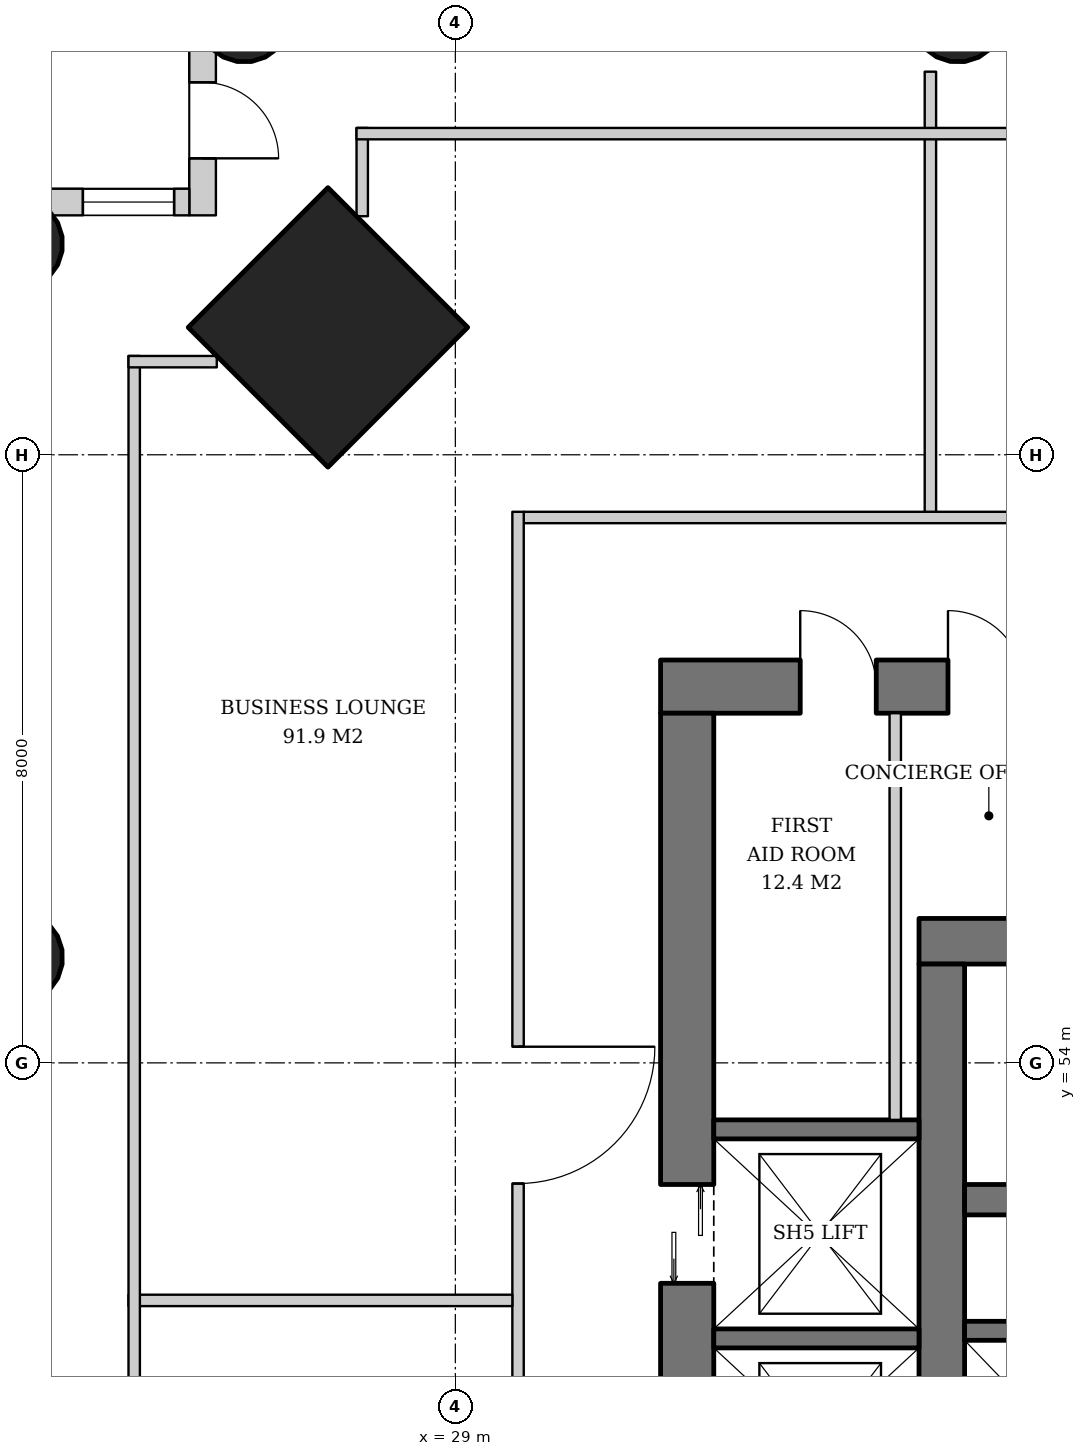
"""IFC4 building model, lengths in metres.
Left out: names, types, materials, properties, quantities, classifications, styles, units other than length and angle.
Written with IfcOpenShell. Run it as: python <this file> out.ifc"""

import sys

from ifc_helpers import new_model, si_unit, direction, frame, frame_2d, origin, origin_2d, place, context, subcontext, project, spatial, rectangle, hollow_circle, extrude, element, fill, save


model = new_model("IFC4")
c1 = context("Model", 3, precision=1e-05, world=origin(), true_north=direction((0.0, 1.0)))
c2 = subcontext(c1, "Body", "Model", "MODEL_VIEW")
j1 = project(units=[si_unit("LENGTHUNIT", "METRE"), si_unit("PLANEANGLEUNIT", "RADIAN")], contexts=[c1])
p1 = place(None, origin())
s1 = spatial("IfcSite", under=j1, at=p1, CompositionType="ELEMENT")
p2 = place(p1, origin())
s2 = spatial("IfcBuilding", under=s1, at=p2, CompositionType="ELEMENT")
p3 = place(p2, frame((0.0, 0.0, 89.4)))
s3 = spatial("IfcBuildingStorey", under=s2, at=p3, CompositionType="ELEMENT", Elevation=89.4)
p4 = place(p3, frame((27.286, 63.714, 0.0), z_axis=(0.031962158256, -0.031962158256, 0.998977898093), x_axis=(0.707106781187, 0.707106781187, 0.0)))
e1 = element("IfcColumn", 1, at=p4, inside=s3, PredefinedType="COLUMN", context=c2, shape_type="SweptSolid", body=[
    extrude(rectangle(XDim=2.6, YDim=2.6, at=origin_2d()), origin(), (0.0, 0.0, 1.0), 3.804),
])
p5 = place(p3, frame((26.186, 67.814, 0.0), z_axis=(0.031898107953, -0.031898107953, 0.998981992539), x_axis=(0.707106781187, 0.707106781187, 0.0)))
e2 = element("IfcColumn", 2, at=p5, inside=s3, PredefinedType="COLUMN", context=c2, shape_type="SweptSolid", body=[
    extrude(hollow_circle(Radius=0.61, WallThickness=0.04, at=origin_2d()), origin(), (0.0, 0.0, 1.0), 3.804),
])
p6 = place(p3, frame((35.593, 67.814, 0.0), z_axis=(0.015987237665, -0.031910269556, 0.999362868496), x_axis=(0.894067115991, 0.447933021895, 0.0)))
e3 = element("IfcColumn", 3, at=p6, inside=s3, PredefinedType="COLUMN", context=c2, shape_type="SweptSolid", body=[
    extrude(hollow_circle(Radius=0.61, WallThickness=0.04, at=origin_2d()), origin(), (0.0, 0.0, 1.0), 3.802),
])
p7 = place(p3, frame((23.186, 64.814, 0.0), z_axis=(0.031898107953, -0.031898107953, 0.998981992539), x_axis=(0.707106781187, 0.707106781187, 0.0)))
e4 = element("IfcColumn", 4, at=p7, inside=s3, PredefinedType="COLUMN", context=c2, shape_type="SweptSolid", body=[
    extrude(hollow_circle(Radius=0.61, WallThickness=0.04, at=origin_2d()), origin(), (0.0, 0.0, 1.0), 3.804),
])
p8 = place(p3, frame((23.186, 55.407, 0.0), z_axis=(0.031910269556, -0.015987237665, 0.999362868496), x_axis=(0.447933021895, 0.894067115991, 0.0)))
e5 = element("IfcColumn", 5, at=p8, inside=s3, PredefinedType="COLUMN", context=c2, shape_type="SweptSolid", body=[
    extrude(hollow_circle(Radius=0.61, WallThickness=0.04, at=origin_2d()), origin(), (0.0, 0.0, 1.0), 3.802),
])
p9 = place(p3, frame((35.1, 55.6, 0.0), z_axis=(0.0, 0.0, 1.0), x_axis=(1.0, 0.0, 0.0)))
e6 = element("IfcWall", 6, at=p9, inside=s3, PredefinedType="SHEAR", context=c2, shape_type="SweptSolid", body=[
    extrude(rectangle(XDim=19.8, YDim=0.6, at=frame_2d((9.9, 0.0))), origin(), (0.0, 0.0, 1.0), 3.8),
])
p10 = place(p9, frame((14.54, 0.0, 0.0)))
e7 = element("IfcOpeningElement", 7, at=p10, cuts=e6, PredefinedType="OPENING", context=c2, shape_type="SweptSolid", body=[
    extrude(rectangle(XDim=1.0, YDim=2.1, at=frame_2d((0.5, 1.05))), frame((0.0, 0.31, 0.0), z_axis=(0.0, -1.0, 0.0), x_axis=(1.0, 0.0, 0.0)), (0.0, 0.0, 1.0), 0.62),
])
p11 = place(p9, frame((2.425, 0.0, 0.0)))
e8 = element("IfcOpeningElement", 8, at=p11, cuts=e6, PredefinedType="OPENING", context=c2, shape_type="SweptSolid", body=[
    extrude(rectangle(XDim=1.0, YDim=2.1, at=frame_2d((0.5, 1.05))), frame((0.0, 0.31, 0.0), z_axis=(0.0, -1.0, 0.0), x_axis=(1.0, 0.0, 0.0)), (0.0, 0.0, 1.0), 0.62),
])
p12 = place(p3, frame((35.4, 36.7, 0.0), z_axis=(0.0, 0.0, 1.0), x_axis=(0.0, 1.0, 0.0)))
e9 = element("IfcWall", 9, at=p12, inside=s3, PredefinedType="SHEAR", context=c2, shape_type="SweptSolid", body=[
    extrude(rectangle(XDim=18.6, YDim=0.6, at=frame_2d((9.3, 0.0))), origin(), (0.0, 0.0, 1.0), 3.8),
])
p13 = place(p12, frame((8.4, 0.0, 0.0)))
e10 = element("IfcOpeningElement", 10, at=p13, cuts=e9, PredefinedType="OPENING", context=c2, shape_type="SweptSolid", body=[
    extrude(rectangle(XDim=1.8, YDim=2.4, at=frame_2d((0.9, 1.2))), frame((0.0, 0.31, 0.0), z_axis=(0.0, -1.0, 0.0), x_axis=(1.0, 0.0, 0.0)), (0.0, 0.0, 1.0), 0.62),
])
p14 = place(p3, frame((31.7, 58.95, 0.0), z_axis=(0.0, 0.0, 1.0), x_axis=(1.0, 0.0, 0.0)))
e11 = element("IfcWall", 11, at=p14, inside=s3, PredefinedType="SHEAR", context=c2, shape_type="SweptSolid", body=[
    extrude(rectangle(XDim=26.6, YDim=0.7, at=frame_2d((13.3, 0.0))), origin(), (0.0, 0.0, 1.0), 3.8),
])
p15 = place(p14, frame((17.94, 0.0, 0.0)))
e12 = element("IfcOpeningElement", 12, at=p15, cuts=e11, PredefinedType="OPENING", context=c2, shape_type="SweptSolid", body=[
    extrude(rectangle(XDim=1.0, YDim=2.1, at=frame_2d((0.5, 1.05))), frame((0.0, 0.36, 0.0), z_axis=(0.0, -1.0, 0.0), x_axis=(1.0, 0.0, 0.0)), (0.0, 0.0, 1.0), 0.72),
])
p16 = place(p14, frame((5.825, 0.0, 0.0)))
e13 = element("IfcOpeningElement", 13, at=p16, cuts=e11, PredefinedType="OPENING", context=c2, shape_type="SweptSolid", body=[
    extrude(rectangle(XDim=1.0, YDim=2.1, at=frame_2d((0.5, 1.05))), frame((0.0, 0.36, 0.0), z_axis=(0.0, -1.0, 0.0), x_axis=(1.0, 0.0, 0.0)), (0.0, 0.0, 1.0), 0.72),
])
p17 = place(p14, frame((1.837, 0.0, 0.0)))
e14 = element("IfcOpeningElement", 14, at=p17, cuts=e11, PredefinedType="OPENING", context=c2, shape_type="SweptSolid", body=[
    extrude(rectangle(XDim=1.0, YDim=2.1, at=frame_2d((0.5, 1.05))), frame((0.0, 0.36, 0.0), z_axis=(0.0, -1.0, 0.0), x_axis=(1.0, 0.0, 0.0)), (0.0, 0.0, 1.0), 0.72),
])
p18 = place(p14, frame((3.781, 0.0, 0.0)))
e15 = element("IfcOpeningElement", 15, at=p18, cuts=e11, PredefinedType="OPENING", context=c2, shape_type="SweptSolid", body=[
    extrude(rectangle(XDim=1.0, YDim=2.1, at=frame_2d((0.5, 1.05))), frame((0.0, 0.36, 0.0), z_axis=(0.0, -1.0, 0.0), x_axis=(1.0, 0.0, 0.0)), (0.0, 0.0, 1.0), 0.72),
])
p19 = place(p14, frame((11.577, 0.0, 0.0)))
e16 = element("IfcOpeningElement", 16, at=p19, cuts=e11, PredefinedType="OPENING", context=c2, shape_type="SweptSolid", body=[
    extrude(rectangle(XDim=1.0, YDim=2.1, at=frame_2d((0.5, 1.05))), frame((0.0, 0.36, 0.0), z_axis=(0.0, -1.0, 0.0), x_axis=(1.0, 0.0, 0.0)), (0.0, 0.0, 1.0), 0.72),
])
p20 = place(p14, frame((20.9, 0.0, 0.0)))
e17 = element("IfcOpeningElement", 17, at=p20, cuts=e11, PredefinedType="OPENING", context=c2, shape_type="SweptSolid", body=[
    extrude(rectangle(XDim=1.0, YDim=2.1, at=frame_2d((0.5, 1.05))), frame((0.0, 0.36, 0.0), z_axis=(0.0, -1.0, 0.0), x_axis=(1.0, 0.0, 0.0)), (0.0, 0.0, 1.0), 0.72),
])
p21 = place(p14, frame((23.75, 0.0, 0.0)))
e18 = element("IfcOpeningElement", 18, at=p21, cuts=e11, PredefinedType="OPENING", context=c2, shape_type="SweptSolid", body=[
    extrude(rectangle(XDim=1.0, YDim=2.1, at=frame_2d((0.5, 1.05))), frame((0.0, 0.36, 0.0), z_axis=(0.0, -1.0, 0.0), x_axis=(1.0, 0.0, 0.0)), (0.0, 0.0, 1.0), 0.72),
])
p22 = place(p3, frame((32.05, 33.4, 0.0), z_axis=(0.0, 0.0, 1.0), x_axis=(0.0, 1.0, 0.0)))
e19 = element("IfcWall", 19, at=p22, inside=s3, PredefinedType="SHEAR", context=c2, shape_type="SweptSolid", body=[
    extrude(rectangle(XDim=25.2, YDim=0.7, at=frame_2d((12.6, 0.0))), origin(), (0.0, 0.0, 1.0), 3.8),
])
p23 = place(p22, frame((3.45, 0.0, 0.0)))
e20 = element("IfcOpeningElement", 20, at=p23, cuts=e19, PredefinedType="OPENING", context=c2, shape_type="SweptSolid", body=[
    extrude(rectangle(XDim=1.3, YDim=2.2, at=frame_2d((0.65, 1.1))), frame((0.0, 0.36, 0.0), z_axis=(0.0, -1.0, 0.0), x_axis=(1.0, 0.0, 0.0)), (0.0, 0.0, 1.0), 0.72),
])
p24 = place(p22, frame((6.2, 0.0, 0.0)))
e21 = element("IfcOpeningElement", 21, at=p24, cuts=e19, PredefinedType="OPENING", context=c2, shape_type="SweptSolid", body=[
    extrude(rectangle(XDim=1.3, YDim=2.2, at=frame_2d((0.65, 1.1))), frame((0.0, 0.36, 0.0), z_axis=(0.0, -1.0, 0.0), x_axis=(1.0, 0.0, 0.0)), (0.0, 0.0, 1.0), 0.72),
])
p25 = place(p22, frame((8.95, 0.0, 0.0)))
e22 = element("IfcOpeningElement", 22, at=p25, cuts=e19, PredefinedType="OPENING", context=c2, shape_type="SweptSolid", body=[
    extrude(rectangle(XDim=1.3, YDim=2.2, at=frame_2d((0.65, 1.1))), frame((0.0, 0.36, 0.0), z_axis=(0.0, -1.0, 0.0), x_axis=(1.0, 0.0, 0.0)), (0.0, 0.0, 1.0), 0.72),
])
p26 = place(p22, frame((14.95, 0.0, 0.0)))
e23 = element("IfcOpeningElement", 23, at=p26, cuts=e19, PredefinedType="OPENING", context=c2, shape_type="SweptSolid", body=[
    extrude(rectangle(XDim=1.3, YDim=2.2, at=frame_2d((0.65, 1.1))), frame((0.0, 0.36, 0.0), z_axis=(0.0, -1.0, 0.0), x_axis=(1.0, 0.0, 0.0)), (0.0, 0.0, 1.0), 0.72),
])
p27 = place(p22, frame((17.7, 0.0, 0.0)))
e24 = element("IfcOpeningElement", 24, at=p27, cuts=e19, PredefinedType="OPENING", context=c2, shape_type="SweptSolid", body=[
    extrude(rectangle(XDim=1.3, YDim=2.2, at=frame_2d((0.65, 1.1))), frame((0.0, 0.36, 0.0), z_axis=(0.0, -1.0, 0.0), x_axis=(1.0, 0.0, 0.0)), (0.0, 0.0, 1.0), 0.72),
])
p28 = place(p22, frame((11.7, 0.0, 0.0)))
e25 = element("IfcOpeningElement", 25, at=p28, cuts=e19, PredefinedType="OPENING", context=c2, shape_type="SweptSolid", body=[
    extrude(rectangle(XDim=1.8, YDim=2.4, at=frame_2d((0.9, 1.2))), frame((0.0, 0.36, 0.0), z_axis=(0.0, -1.0, 0.0), x_axis=(1.0, 0.0, 0.0)), (0.0, 0.0, 1.0), 0.72),
])
p29 = place(p3, frame((35.7, 52.2, 0.0), z_axis=(0.0, 0.0, 1.0), x_axis=(1.0, 0.0, 0.0)))
e26 = element("IfcWall", 26, at=p29, inside=s3, PredefinedType="SHEAR", context=c2, shape_type="SweptSolid", body=[
    extrude(rectangle(XDim=18.6, YDim=0.4, at=frame_2d((9.3, 0.0))), origin(), (0.0, 0.0, 1.0), 3.8),
])
p30 = place(p3, frame((25.675, 68.5, 0.0), z_axis=(0.0, 0.0, 1.0), x_axis=(0.0, -1.0, 0.0)))
e27 = element("IfcWall", 27, at=p30, inside=s3, PredefinedType="SOLIDWALL", context=c2, shape_type="SweptSolid", body=[
    extrude(rectangle(XDim=3.35, YDim=0.35, at=frame_2d((1.675, 0.0))), origin(), (0.0, 0.0, 1.0), 3.62),
])
p31 = place(p30, frame((1.6, 0.0, 0.0)))
e28 = element("IfcOpeningElement", 28, at=p31, cuts=e27, PredefinedType="OPENING", context=c2, shape_type="SweptSolid", body=[
    extrude(rectangle(XDim=1.0, YDim=2.4, at=frame_2d((0.5, 1.2))), frame((0.0, 0.185, 0.0), z_axis=(0.0, -1.0, 0.0), x_axis=(1.0, 0.0, 0.0)), (0.0, 0.0, 1.0), 0.37),
])
p32 = place(p3, frame((25.5, 65.325, 0.0), z_axis=(0.0, 0.0, 1.0), x_axis=(-1.0, 0.0, 0.0)))
e29 = element("IfcWall", 29, at=p32, inside=s3, PredefinedType="SOLIDWALL", context=c2, shape_type="SweptSolid", body=[
    extrude(rectangle(XDim=3.0, YDim=0.35, at=frame_2d((1.5, 0.0))), origin(), (0.0, 0.0, 1.0), 3.62),
])
p33 = place(p32, frame((0.2, 0.0, 0.6)))
e30 = element("IfcOpeningElement", 30, at=p33, cuts=e29, PredefinedType="OPENING", context=c2, shape_type="SweptSolid", body=[
    extrude(rectangle(XDim=1.2, YDim=2.55, at=frame_2d((0.6, 1.275))), frame((0.0, 0.185, 0.0), z_axis=(0.0, -1.0, 0.0), x_axis=(1.0, 0.0, 0.0)), (0.0, 0.0, 1.0), 0.37),
])
p34 = place(p3, frame((35.7, 50.475, 0.0), z_axis=(0.0, 0.0, 1.0), x_axis=(1.0, 0.0, 0.0)))
e31 = element("IfcWall", 31, at=p34, inside=s3, PredefinedType="SHEAR", context=c2, shape_type="SweptSolid", body=[
    extrude(rectangle(XDim=11.0, YDim=0.25, at=frame_2d((5.5, 0.0))), origin(), (0.0, 0.0, 1.0), 3.8),
])
for number, where, z_axis, x_axis in (
    (32, (32.4, 50.375, 0.0), (0.0, 0.0, 1.0), (1.0, 0.0, 0.0)),
    (33, (32.4, 53.125, 0.0), (0.0, 0.0, 1.0), (1.0, 0.0, 0.0)),
):
    element("IfcWall", number, at=place(p3, frame(where, z_axis=z_axis, x_axis=x_axis)), inside=s3, PredefinedType="SHEAR", context=c2, shape_type="SweptSolid", body=[
        extrude(rectangle(XDim=2.7, YDim=0.25, at=frame_2d((1.35, 0.0))), origin(), (0.0, 0.0, 1.0), 3.8),
    ])
p35 = place(p3, frame((34.788, 53.25, 0.0), z_axis=(0.0, 0.0, 1.0), x_axis=(0.0, 1.0, 0.0)))
e34 = element("IfcWall", 34, at=p35, inside=s3, PredefinedType="SOLIDWALL", context=c2, shape_type="SweptSolid", body=[
    extrude(rectangle(XDim=5.35, YDim=0.15, at=frame_2d((2.675, 0.0))), origin(), (0.0, 0.0, 1.0), 3.62),
])
p36 = place(p3, frame((60.25, 61.175, 0.0), z_axis=(0.0, 0.0, 1.0), x_axis=(-1.0, 0.0, 0.0)))
e35 = element("IfcWall", 35, at=p36, inside=s3, PredefinedType="PARTITIONING", context=c2, shape_type="SweptSolid", body=[
    extrude(rectangle(XDim=30.35, YDim=0.15, at=frame_2d((15.175, 0.0))), origin(), (0.0, 0.0, 1.0), 2.612),
])
p37 = place(p36, frame((7.438, 0.0, 0.0)))
e36 = element("IfcOpeningElement", 36, at=p37, cuts=e35, PredefinedType="OPENING", context=c2, shape_type="SweptSolid", body=[
    extrude(rectangle(XDim=1.0, YDim=2.1, at=frame_2d((0.5, 1.05))), frame((0.0, 0.085, 0.0), z_axis=(0.0, -1.0, 0.0), x_axis=(1.0, 0.0, 0.0)), (0.0, 0.0, 1.0), 0.17),
])
p38 = place(p36, frame((12.312, 0.0, 0.0)))
e37 = element("IfcOpeningElement", 37, at=p38, cuts=e35, PredefinedType="OPENING", context=c2, shape_type="SweptSolid", body=[
    extrude(rectangle(XDim=1.0, YDim=2.1, at=frame_2d((0.5, 1.05))), frame((0.0, 0.085, 0.0), z_axis=(0.0, -1.0, 0.0), x_axis=(1.0, 0.0, 0.0)), (0.0, 0.0, 1.0), 0.17),
])
p39 = place(p36, frame((17.188, 0.0, 0.0)))
e38 = element("IfcOpeningElement", 38, at=p39, cuts=e35, PredefinedType="OPENING", context=c2, shape_type="SweptSolid", body=[
    extrude(rectangle(XDim=1.0, YDim=2.1, at=frame_2d((0.5, 1.05))), frame((0.0, 0.085, 0.0), z_axis=(0.0, -1.0, 0.0), x_axis=(1.0, 0.0, 0.0)), (0.0, 0.0, 1.0), 0.17),
])
p40 = place(p36, frame((22.062, 0.0, 0.0)))
e39 = element("IfcOpeningElement", 39, at=p40, cuts=e35, PredefinedType="OPENING", context=c2, shape_type="SweptSolid", body=[
    extrude(rectangle(XDim=1.0, YDim=2.1, at=frame_2d((0.5, 1.05))), frame((0.0, 0.085, 0.0), z_axis=(0.0, -1.0, 0.0), x_axis=(1.0, 0.0, 0.0)), (0.0, 0.0, 1.0), 0.17),
])
p41 = place(p3, frame((35.25, 61.25, 0.0), z_axis=(0.0, 0.0, 1.0), x_axis=(0.0, 1.0, 0.0)))
e40 = element("IfcWall", 40, at=p41, inside=s3, PredefinedType="PARTITIONING", context=c2, shape_type="SweptSolid", body=[
    extrude(rectangle(XDim=5.79, YDim=0.15, at=frame_2d((2.895, 0.0))), origin(), (0.0, 0.0, 1.0), 3.62),
])
p42 = place(p3, frame((29.825, 61.25, 0.0), z_axis=(0.0, 0.0, 1.0), x_axis=(0.0, -1.0, 0.0)))
e41 = element("IfcWall", 41, at=p42, inside=s3, PredefinedType="PARTITIONING", context=c2, shape_type="SweptSolid", body=[
    extrude(rectangle(XDim=30.35, YDim=0.15, at=frame_2d((15.175, 0.0))), origin(), (0.0, 0.0, 1.0), 2.612),
])
p43 = place(p42, frame((7.038, 0.0, 0.0)))
e42 = element("IfcOpeningElement", 42, at=p43, cuts=e41, PredefinedType="OPENING", context=c2, shape_type="SweptSolid", body=[
    extrude(rectangle(XDim=1.8, YDim=2.4, at=frame_2d((0.9, 1.2))), frame((0.0, 0.085, 0.0), z_axis=(0.0, -1.0, 0.0), x_axis=(1.0, 0.0, 0.0)), (0.0, 0.0, 1.0), 0.17),
])
p44 = place(p42, frame((12.413, 0.0, 0.0)))
e43 = element("IfcOpeningElement", 43, at=p44, cuts=e41, PredefinedType="OPENING", context=c2, shape_type="SweptSolid", body=[
    extrude(rectangle(XDim=0.8, YDim=2.1, at=frame_2d((0.4, 1.05))), frame((0.0, 0.085, 0.0), z_axis=(0.0, -1.0, 0.0), x_axis=(1.0, 0.0, 0.0)), (0.0, 0.0, 1.0), 0.17),
])
p45 = place(p42, frame((17.188, 0.0, 0.0)))
e44 = element("IfcOpeningElement", 44, at=p45, cuts=e41, PredefinedType="OPENING", context=c2, shape_type="SweptSolid", body=[
    extrude(rectangle(XDim=1.0, YDim=2.1, at=frame_2d((0.5, 1.05))), frame((0.0, 0.085, 0.0), z_axis=(0.0, -1.0, 0.0), x_axis=(1.0, 0.0, 0.0)), (0.0, 0.0, 1.0), 0.17),
])
p46 = place(p42, frame((22.163, 0.0, 0.0)))
e45 = element("IfcOpeningElement", 45, at=p46, cuts=e41, PredefinedType="OPENING", context=c2, shape_type="SweptSolid", body=[
    extrude(rectangle(XDim=0.8, YDim=2.1, at=frame_2d((0.4, 1.05))), frame((0.0, 0.085, 0.0), z_axis=(0.0, -1.0, 0.0), x_axis=(1.0, 0.0, 0.0)), (0.0, 0.0, 1.0), 0.17),
])
p47 = place(p3, frame((29.75, 50.875, 0.0), z_axis=(0.0, 0.0, 1.0), x_axis=(-1.0, 0.0, 0.0)))
e46 = element("IfcWall", 46, at=p47, inside=s3, PredefinedType="PARTITIONING", context=c2, shape_type="SweptSolid", body=[
    extrude(rectangle(XDim=5.05, YDim=0.15, at=frame_2d((2.525, 0.0))), origin(), (0.0, 0.0, 1.0), 3.62),
])
p48 = place(p3, frame((24.775, 28.7, 0.0), z_axis=(0.0, 0.0, 1.0), x_axis=(0.0, 1.0, 0.0)))
e47 = element("IfcWall", 47, at=p48, inside=s3, PredefinedType="PARTITIONING", context=c2, shape_type="SweptSolid", body=[
    extrude(rectangle(XDim=34.6, YDim=0.15, at=frame_2d((17.3, 0.0))), origin(), (0.0, 0.0, 1.0), 2.612),
])
for number, where, z_axis, x_axis in (
    (48, (24.7, 63.225, 0.0), (0.0, 0.0, 1.0), (1.0, 0.0, 0.0)),
    (49, (27.775, 65.138, 0.0), (0.0, 0.0, 1.0), (0.0, 1.0, 0.0)),
):
    element("IfcWall", number, at=place(p3, frame(where, z_axis=z_axis, x_axis=x_axis)), inside=s3, PredefinedType="PARTITIONING", context=c2, shape_type="SweptSolid", body=[
        extrude(rectangle(XDim=1.162, YDim=0.15, at=frame_2d((0.581, 0.0))), origin(), (0.0, 0.0, 1.0), 3.62),
    ])
p49 = place(p3, frame((27.7, 66.225, 0.0), z_axis=(0.0, 0.0, 1.0), x_axis=(1.0, 0.0, 0.0)))
e50 = element("IfcWall", 50, at=p49, inside=s3, PredefinedType="PARTITIONING", context=c2, shape_type="SweptSolid", body=[
    extrude(rectangle(XDim=34.6, YDim=0.15, at=frame_2d((17.3, 0.0))), origin(), (0.0, 0.0, 1.0), 2.612),
])
p50 = place(p31, origin())
e51 = element("IfcDoor", 51, at=p50, inside=s3, OperationType="SINGLE_SWING_RIGHT", PredefinedType="DOOR", context=c2, shape_type="SweptSolid", body=[
    extrude(rectangle(XDim=1.0, YDim=2.4, at=frame_2d((0.5, 1.2))), frame((0.0, 0.025, 0.0), z_axis=(0.0, -1.0, 0.0), x_axis=(1.0, 0.0, 0.0)), (0.0, 0.0, 1.0), 0.05),
])
fill(e28, e51)
p51 = place(p33, origin())
e52 = element("IfcWindow", 52, at=p51, inside=s3, PartitioningType="SINGLE_PANEL", PredefinedType="WINDOW", context=c2, shape_type="SweptSolid", body=[
    extrude(rectangle(XDim=1.2, YDim=2.55, at=frame_2d((0.6, 1.275))), frame((0.0, 0.03, 0.0), z_axis=(0.0, -1.0, 0.0), x_axis=(1.0, 0.0, 0.0)), (0.0, 0.0, 1.0), 0.06),
])
fill(e30, e52)
p52 = place(p27, origin())
e53 = element("IfcDoor", 53, at=p52, inside=s3, OperationType="DOUBLE_DOOR_SLIDING", PredefinedType="DOOR", context=c2, shape_type="SweptSolid", body=[
    extrude(rectangle(XDim=1.3, YDim=2.2, at=frame_2d((0.65, 1.1))), frame((0.0, 0.025, 0.0), z_axis=(0.0, -1.0, 0.0), x_axis=(1.0, 0.0, 0.0)), (0.0, 0.0, 1.0), 0.05),
])
fill(e24, e53)
p53 = place(p17, origin())
e54 = element("IfcDoor", 54, at=p53, inside=s3, OperationType="SINGLE_SWING_LEFT", PredefinedType="DOOR", context=c2, shape_type="SweptSolid", body=[
    extrude(rectangle(XDim=1.0, YDim=2.1, at=frame_2d((0.5, 1.05))), frame((0.0, -0.29, 0.0), z_axis=(0.0, -1.0, 0.0), x_axis=(1.0, 0.0, 0.0)), (0.0, 0.0, 1.0), 0.05),
])
fill(e14, e54)
p54 = place(p18, origin())
e55 = element("IfcDoor", 55, at=p54, inside=s3, OperationType="SINGLE_SWING_LEFT", PredefinedType="DOOR", context=c2, shape_type="SweptSolid", body=[
    extrude(rectangle(XDim=1.0, YDim=2.1, at=frame_2d((0.5, 1.05))), frame((0.0, -0.29, 0.0), z_axis=(0.0, -1.0, 0.0), x_axis=(1.0, 0.0, 0.0)), (0.0, 0.0, 1.0), 0.05),
])
fill(e15, e55)
p55 = place(p43, origin())
e56 = element("IfcDoor", 56, at=p55, inside=s3, OperationType="DOUBLE_DOOR_SINGLE_SWING", PredefinedType="DOOR", context=c2, shape_type="SweptSolid", body=[
    extrude(rectangle(XDim=1.8, YDim=2.4, at=frame_2d((0.9, 1.2))), frame((0.0, 0.025, 0.0), z_axis=(0.0, -1.0, 0.0), x_axis=(1.0, 0.0, 0.0)), (0.0, 0.0, 1.0), 0.05),
])
fill(e42, e56)
save(model, sys.argv[1])
